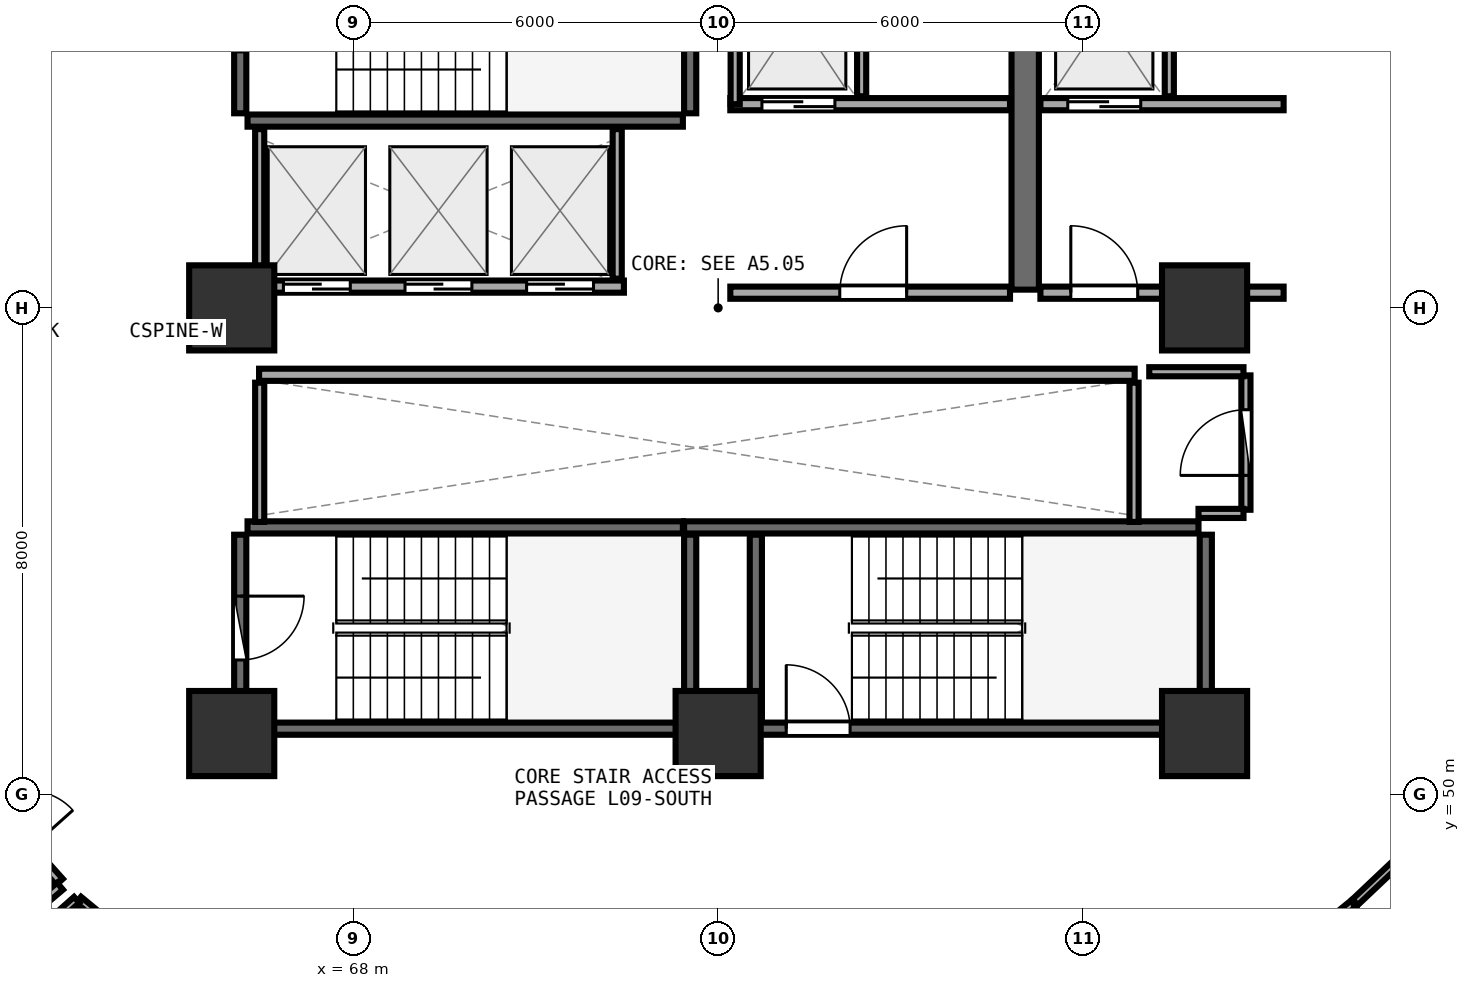
"""IFC4 building model, lengths in metres.
Left out: names, types, materials, properties, quantities, classifications, styles, units other than length and angle.
Written with IfcOpenShell. Run it as: python <this file> out.ifc"""

import sys

from ifc_helpers import new_model, si_unit, direction, frame, frame_2d, origin, origin_2d, place, context, subcontext, project, spatial, rectangle, extrude, element, fill, save


model = new_model("IFC4")
c1 = context("Model", 3, precision=1e-05, world=origin(), true_north=direction((0.0, 1.0)))
c2 = subcontext(c1, "Body", "Model", "MODEL_VIEW")
j1 = project(units=[si_unit("LENGTHUNIT", "METRE"), si_unit("PLANEANGLEUNIT", "RADIAN")], contexts=[c1])
p1 = place(None, origin())
s1 = spatial("IfcSite", under=j1, at=p1, CompositionType="ELEMENT")
p2 = place(p1, origin())
s2 = spatial("IfcBuilding", under=s1, at=p2, CompositionType="ELEMENT")
p3 = place(p2, frame((0.0, 0.0, 37.5)))
s3 = spatial("IfcBuildingStorey", under=s2, at=p3, CompositionType="ELEMENT", Elevation=37.5)
for number, where, z_axis, x_axis in (
    (1, (66.0, 51.0, 0.0), (0.0, 0.0, 1.0), (1.0, 0.0, 0.0)),
    (2, (74.0, 51.0, 0.0), (0.0, 0.0, 1.0), (1.0, 0.0, 0.0)),
    (3, (82.0, 51.0, 0.0), (0.0, 0.0, 1.0), (1.0, 0.0, 0.0)),
    (4, (82.0, 58.0, 0.0), (0.0, 0.0, 1.0), (1.0, 0.0, 0.0)),
    (5, (66.0, 58.0, 0.0), (0.0, 0.0, 1.0), (1.0, 0.0, 0.0)),
):
    element("IfcColumn", number, at=place(p3, frame(where, z_axis=z_axis, x_axis=x_axis)), inside=s3, PredefinedType="PILASTER", context=c2, shape_type="SweptSolid", body=[
        extrude(rectangle(XDim=1.4, YDim=1.4, at=origin_2d()), origin(), (0.0, 0.0, 1.0), 3.75),
    ])
p4 = place(p3, frame((66.26, 61.08, 0.0), z_axis=(0.0, 0.0, 1.0), x_axis=(1.0, 0.0, 0.0)))
e6 = element("IfcWall", 6, at=p4, inside=s3, PredefinedType="SHEAR", context=c2, shape_type="SweptSolid", body=[
    extrude(rectangle(XDim=7.16, YDim=0.2, at=frame_2d((3.58, 0.0))), origin(), (0.0, 0.0, 1.0), 3.49),
])
p5 = place(p3, frame((73.54, 61.2, 0.0), z_axis=(0.0, 0.0, 1.0), x_axis=(0.0, 1.0, 0.0)))
e7 = element("IfcWall", 7, at=p5, inside=s3, PredefinedType="SHEAR", context=c2, shape_type="SweptSolid", body=[
    extrude(rectangle(XDim=3.07, YDim=0.2, at=frame_2d((1.535, 0.0))), origin(), (0.0, 0.0, 1.0), 3.49),
])
p6 = place(p3, frame((66.14, 64.27, 0.0), z_axis=(0.0, 0.0, 1.0), x_axis=(0.0, -1.0, 0.0)))
e8 = element("IfcWall", 8, at=p6, inside=s3, PredefinedType="SHEAR", context=c2, shape_type="SweptSolid", body=[
    extrude(rectangle(XDim=3.07, YDim=0.2, at=frame_2d((1.535, 0.0))), origin(), (0.0, 0.0, 1.0), 3.49),
])
p7 = place(p6, frame((1.01, 0.0, 0.0)))
e9 = element("IfcOpeningElement", 9, at=p7, cuts=e8, PredefinedType="OPENING", context=c2, shape_type="SweptSolid", body=[
    extrude(rectangle(XDim=1.05, YDim=2.1, at=frame_2d((0.525, 1.05))), frame((0.0, 0.11, 0.0), z_axis=(0.0, -1.0, 0.0), x_axis=(1.0, 0.0, 0.0)), (0.0, 0.0, 1.0), 0.22),
])
p8 = place(p3, frame((74.0, 51.08, 0.0), z_axis=(0.0, 0.0, 1.0), x_axis=(1.0, 0.0, 0.0)))
e10 = element("IfcWall", 10, at=p8, inside=s3, PredefinedType="SHEAR", context=c2, shape_type="SweptSolid", body=[
    extrude(rectangle(XDim=7.9, YDim=0.2, at=frame_2d((3.95, 0.0))), origin(), (0.0, 0.0, 1.0), 3.49),
])
p9 = place(p8, frame((1.12, 0.0, 0.0)))
e11 = element("IfcOpeningElement", 11, at=p9, cuts=e10, PredefinedType="OPENING", context=c2, shape_type="SweptSolid", body=[
    extrude(rectangle(XDim=1.05, YDim=2.1, at=frame_2d((0.525, 1.05))), frame((0.0, 0.11, 0.0), z_axis=(0.0, -1.0, 0.0), x_axis=(1.0, 0.0, 0.0)), (0.0, 0.0, 1.0), 0.22),
])
p10 = place(p3, frame((82.02, 51.2, 0.0), z_axis=(0.0, 0.0, 1.0), x_axis=(0.0, 1.0, 0.0)))
e12 = element("IfcWall", 12, at=p10, inside=s3, PredefinedType="SHEAR", context=c2, shape_type="SweptSolid", body=[
    extrude(rectangle(XDim=3.07, YDim=0.2, at=frame_2d((1.535, 0.0))), origin(), (0.0, 0.0, 1.0), 3.49),
])
p11 = place(p3, frame((81.9, 54.39, 0.0), z_axis=(0.0, 0.0, 1.0), x_axis=(-1.0, 0.0, 0.0)))
e13 = element("IfcWall", 13, at=p11, inside=s3, PredefinedType="SHEAR", context=c2, shape_type="SweptSolid", body=[
    extrude(rectangle(XDim=8.46, YDim=0.2, at=frame_2d((4.23, 0.0))), origin(), (0.0, 0.0, 1.0), 3.49),
])
p12 = place(p3, frame((74.62, 54.27, 0.0), z_axis=(0.0, 0.0, 1.0), x_axis=(0.0, -1.0, 0.0)))
e14 = element("IfcWall", 14, at=p12, inside=s3, PredefinedType="SHEAR", context=c2, shape_type="SweptSolid", body=[
    extrude(rectangle(XDim=3.07, YDim=0.2, at=frame_2d((1.535, 0.0))), origin(), (0.0, 0.0, 1.0), 3.49),
])
p13 = place(p3, frame((66.26, 51.08, 0.0), z_axis=(0.0, 0.0, 1.0), x_axis=(1.0, 0.0, 0.0)))
e15 = element("IfcWall", 15, at=p13, inside=s3, PredefinedType="SHEAR", context=c2, shape_type="SweptSolid", body=[
    extrude(rectangle(XDim=7.16, YDim=0.2, at=frame_2d((3.58, 0.0))), origin(), (0.0, 0.0, 1.0), 3.49),
])
p14 = place(p3, frame((73.54, 51.2, 0.0), z_axis=(0.0, 0.0, 1.0), x_axis=(0.0, 1.0, 0.0)))
e16 = element("IfcWall", 16, at=p14, inside=s3, PredefinedType="SHEAR", context=c2, shape_type="SweptSolid", body=[
    extrude(rectangle(XDim=3.07, YDim=0.2, at=frame_2d((1.535, 0.0))), origin(), (0.0, 0.0, 1.0), 3.49),
])
p15 = place(p3, frame((73.42, 54.39, 0.0), z_axis=(0.0, 0.0, 1.0), x_axis=(-1.0, 0.0, 0.0)))
e17 = element("IfcWall", 17, at=p15, inside=s3, PredefinedType="SHEAR", context=c2, shape_type="SweptSolid", body=[
    extrude(rectangle(XDim=7.16, YDim=0.2, at=frame_2d((3.58, 0.0))), origin(), (0.0, 0.0, 1.0), 3.49),
])
p16 = place(p3, frame((66.14, 54.27, 0.0), z_axis=(0.0, 0.0, 1.0), x_axis=(0.0, -1.0, 0.0)))
e18 = element("IfcWall", 18, at=p16, inside=s3, PredefinedType="SHEAR", context=c2, shape_type="SweptSolid", body=[
    extrude(rectangle(XDim=3.07, YDim=0.2, at=frame_2d((1.535, 0.0))), origin(), (0.0, 0.0, 1.0), 3.49),
])
p17 = place(p16, frame((1.01, 0.0, 0.0)))
e19 = element("IfcOpeningElement", 19, at=p17, cuts=e18, PredefinedType="OPENING", context=c2, shape_type="SweptSolid", body=[
    extrude(rectangle(XDim=1.05, YDim=2.1, at=frame_2d((0.525, 1.05))), frame((0.0, 0.11, 0.0), z_axis=(0.0, -1.0, 0.0), x_axis=(1.0, 0.0, 0.0)), (0.0, 0.0, 1.0), 0.22),
])
p18 = place(p3, frame((79.05, 58.3, 0.0), z_axis=(0.0, 0.0, 1.0), x_axis=(0.0, 1.0, 0.0)))
e20 = element("IfcWall", 20, at=p18, inside=s3, PredefinedType="SHEAR", context=c2, shape_type="SweptSolid", body=[
    extrude(rectangle(XDim=6.3, YDim=0.45, at=frame_2d((3.15, 0.0))), origin(), (0.0, 0.0, 1.0), 3.49),
])
p19 = place(p3, frame((74.2, 61.35, 0.0), z_axis=(0.0, 0.0, 1.0), x_axis=(1.0, 0.0, 0.0)))
e21 = element("IfcWall", 21, at=p19, inside=s3, PredefinedType="SOLIDWALL", context=c2, shape_type="SweptSolid", body=[
    extrude(rectangle(XDim=4.6, YDim=0.2, at=frame_2d((2.3, 0.0))), origin(), (0.0, 0.0, 1.0), 3.48),
])
p20 = place(p19, frame((0.52, 0.0, 0.0)))
e22 = element("IfcOpeningElement", 22, at=p20, cuts=e21, PredefinedType="OPENING", context=c2, shape_type="SweptSolid", body=[
    extrude(rectangle(XDim=1.2, YDim=2.15, at=frame_2d((0.6, 1.075))), frame((0.0, 0.11, 0.0), z_axis=(0.0, -1.0, 0.0), x_axis=(1.0, 0.0, 0.0)), (0.0, 0.0, 1.0), 0.22),
])
p21 = place(p3, frame((74.28, 61.35, 0.0), z_axis=(0.0, 0.0, 1.0), x_axis=(0.0, 1.0, 0.0)))
e23 = element("IfcWall", 23, at=p21, inside=s3, PredefinedType="PARTITIONING", context=c2, shape_type="SweptSolid", body=[
    extrude(rectangle(XDim=2.97, YDim=0.15, at=frame_2d((1.485, 0.0))), origin(), (0.0, 0.0, 1.0), 3.48),
])
p22 = place(p3, frame((76.36, 61.48, 0.0), z_axis=(0.0, 0.0, 1.0), x_axis=(0.0, 1.0, 0.0)))
e24 = element("IfcWall", 24, at=p22, inside=s3, PredefinedType="PARTITIONING", context=c2, shape_type="SweptSolid", body=[
    extrude(rectangle(XDim=2.84, YDim=0.15, at=frame_2d((1.42, 0.0))), origin(), (0.0, 0.0, 1.0), 3.48),
])
p23 = place(p3, frame((79.3, 61.35, 0.0), z_axis=(0.0, 0.0, 1.0), x_axis=(1.0, 0.0, 0.0)))
e25 = element("IfcWall", 25, at=p23, inside=s3, PredefinedType="SOLIDWALL", context=c2, shape_type="SweptSolid", body=[
    extrude(rectangle(XDim=4.0, YDim=0.2, at=frame_2d((2.0, 0.0))), origin(), (0.0, 0.0, 1.0), 2.775),
])
p24 = place(p23, frame((0.45, 0.0, 0.0)))
e26 = element("IfcOpeningElement", 26, at=p24, cuts=e25, PredefinedType="OPENING", context=c2, shape_type="SweptSolid", body=[
    extrude(rectangle(XDim=1.2, YDim=2.15, at=frame_2d((0.6, 1.075))), frame((0.0, 0.11, 0.0), z_axis=(0.0, -1.0, 0.0), x_axis=(1.0, 0.0, 0.0)), (0.0, 0.0, 1.0), 0.22),
])
p25 = place(p3, frame((81.42, 61.48, 0.0), z_axis=(0.0, 0.0, 1.0), x_axis=(0.0, 1.0, 0.0)))
e27 = element("IfcWall", 27, at=p25, inside=s3, PredefinedType="PARTITIONING", context=c2, shape_type="SweptSolid", body=[
    extrude(rectangle(XDim=2.84, YDim=0.15, at=frame_2d((1.42, 0.0))), origin(), (0.0, 0.0, 1.0), 3.48),
])
p26 = place(p3, frame((74.2, 58.25, 0.0), z_axis=(0.0, 0.0, 1.0), x_axis=(1.0, 0.0, 0.0)))
e28 = element("IfcWall", 28, at=p26, inside=s3, PredefinedType="SOLIDWALL", context=c2, shape_type="SweptSolid", body=[
    extrude(rectangle(XDim=4.6, YDim=0.2, at=frame_2d((2.3, 0.0))), origin(), (0.0, 0.0, 1.0), 3.48),
])
p27 = place(p26, frame((1.8, 0.0, 0.0)))
e29 = element("IfcOpeningElement", 29, at=p27, cuts=e28, PredefinedType="OPENING", context=c2, shape_type="SweptSolid", body=[
    extrude(rectangle(XDim=1.1, YDim=2.1, at=frame_2d((0.55, 1.05))), frame((0.0, 0.11, 0.0), z_axis=(0.0, -1.0, 0.0), x_axis=(1.0, 0.0, 0.0)), (0.0, 0.0, 1.0), 0.22),
])
p28 = place(p3, frame((79.3, 58.25, 0.0), z_axis=(0.0, 0.0, 1.0), x_axis=(1.0, 0.0, 0.0)))
e30 = element("IfcWall", 30, at=p28, inside=s3, PredefinedType="SOLIDWALL", context=c2, shape_type="SweptSolid", body=[
    extrude(rectangle(XDim=4.0, YDim=0.2, at=frame_2d((2.0, 0.0))), origin(), (0.0, 0.0, 1.0), 2.775),
])
p29 = place(p28, frame((0.5, 0.0, 0.0)))
e31 = element("IfcOpeningElement", 31, at=p29, cuts=e30, PredefinedType="OPENING", context=c2, shape_type="SweptSolid", body=[
    extrude(rectangle(XDim=1.1, YDim=2.1, at=frame_2d((0.55, 1.05))), frame((0.0, 0.11, 0.0), z_axis=(0.0, -1.0, 0.0), x_axis=(1.0, 0.0, 0.0)), (0.0, 0.0, 1.0), 0.22),
])
p30 = place(p3, frame((66.45, 58.35, 0.0), z_axis=(0.0, 0.0, 1.0), x_axis=(1.0, 0.0, 0.0)))
e32 = element("IfcWall", 32, at=p30, inside=s3, PredefinedType="SOLIDWALL", context=c2, shape_type="SweptSolid", body=[
    extrude(rectangle(XDim=6.0, YDim=0.2, at=frame_2d((3.0, 0.0))), origin(), (0.0, 0.0, 1.0), 3.48),
])
p31 = place(p30, frame((0.4, 0.0, 0.0)))
e33 = element("IfcOpeningElement", 33, at=p31, cuts=e32, PredefinedType="OPENING", context=c2, shape_type="SweptSolid", body=[
    extrude(rectangle(XDim=1.1, YDim=2.1, at=frame_2d((0.55, 1.05))), frame((0.0, 0.11, 0.0), z_axis=(0.0, -1.0, 0.0), x_axis=(1.0, 0.0, 0.0)), (0.0, 0.0, 1.0), 0.22),
])
p32 = place(p30, frame((2.4, 0.0, 0.0)))
e34 = element("IfcOpeningElement", 34, at=p32, cuts=e32, PredefinedType="OPENING", context=c2, shape_type="SweptSolid", body=[
    extrude(rectangle(XDim=1.1, YDim=2.1, at=frame_2d((0.55, 1.05))), frame((0.0, 0.11, 0.0), z_axis=(0.0, -1.0, 0.0), x_axis=(1.0, 0.0, 0.0)), (0.0, 0.0, 1.0), 0.22),
])
p33 = place(p30, frame((4.4, 0.0, 0.0)))
e35 = element("IfcOpeningElement", 35, at=p33, cuts=e32, PredefinedType="OPENING", context=c2, shape_type="SweptSolid", body=[
    extrude(rectangle(XDim=1.1, YDim=2.1, at=frame_2d((0.55, 1.05))), frame((0.0, 0.11, 0.0), z_axis=(0.0, -1.0, 0.0), x_axis=(1.0, 0.0, 0.0)), (0.0, 0.0, 1.0), 0.22),
])
for number, where, z_axis, x_axis in (
    (36, (66.46, 58.48, 0.0), (0.0, 0.0, 1.0), (0.0, 1.0, 0.0)),
    (37, (72.34, 58.48, 0.0), (0.0, 0.0, 1.0), (0.0, 1.0, 0.0)),
):
    element("IfcWall", number, at=place(p3, frame(where, z_axis=z_axis, x_axis=x_axis)), inside=s3, PredefinedType="PARTITIONING", context=c2, shape_type="SweptSolid", body=[
        extrude(rectangle(XDim=2.46, YDim=0.15, at=frame_2d((1.23, 0.0))), origin(), (0.0, 0.0, 1.0), 3.48),
    ])
p34 = place(p3, frame((66.45, 56.9, 0.0), z_axis=(0.0, 0.0, 1.0), x_axis=(1.0, 0.0, 0.0)))
e38 = element("IfcWall", 38, at=p34, inside=s3, PredefinedType="SOLIDWALL", context=c2, shape_type="SweptSolid", body=[
    extrude(rectangle(XDim=14.4, YDim=0.2, at=frame_2d((7.2, 0.0))), origin(), (0.0, 0.0, 1.0), 3.48),
])
for number, where, z_axis, x_axis in (
    (39, (66.46, 54.48, 0.0), (0.0, 0.0, 1.0), (0.0, 1.0, 0.0)),
    (40, (80.84, 54.48, 0.0), (0.0, 0.0, 1.0), (0.0, 1.0, 0.0)),
):
    element("IfcWall", number, at=place(p3, frame(where, z_axis=z_axis, x_axis=x_axis)), inside=s3, PredefinedType="PARTITIONING", context=c2, shape_type="SweptSolid", body=[
        extrude(rectangle(XDim=2.29, YDim=0.15, at=frame_2d((1.145, 0.0))), origin(), (0.0, 0.0, 1.0), 3.48),
    ])
p35 = place(p3, frame((82.68, 54.68, 0.0), z_axis=(0.0, 0.0, 1.0), x_axis=(0.0, 1.0, 0.0)))
e41 = element("IfcWall", 41, at=p35, inside=s3, PredefinedType="PARTITIONING", context=c2, shape_type="SweptSolid", body=[
    extrude(rectangle(XDim=2.21, YDim=0.15, at=frame_2d((1.105, 0.0))), origin(), (0.0, 0.0, 1.0), 3.48),
])
p36 = place(p35, frame((0.565, 0.0, 0.0)))
e42 = element("IfcOpeningElement", 42, at=p36, cuts=e41, PredefinedType="OPENING", context=c2, shape_type="SweptSolid", body=[
    extrude(rectangle(XDim=1.08, YDim=2.1, at=frame_2d((0.54, 1.05))), frame((0.0, 0.085, 0.0), z_axis=(0.0, -1.0, 0.0), x_axis=(1.0, 0.0, 0.0)), (0.0, 0.0, 1.0), 0.17),
])
p37 = place(p3, frame((61.559, 50.36, 0.0), z_axis=(0.0, 0.0, 1.0), x_axis=(0.66613233843, -0.745833565682, 0.0)))
e43 = element("IfcWall", 43, at=p37, inside=s3, PredefinedType="PARTITIONING", context=c2, shape_type="SweptSolid", body=[
    extrude(rectangle(XDim=2.414, YDim=0.15, at=frame_2d((1.207, 0.0))), origin(), (0.0, 0.0, 1.0), 2.875),
])
p38 = place(p37, frame((0.732, 0.0, 0.0)))
e44 = element("IfcOpeningElement", 44, at=p38, cuts=e43, PredefinedType="OPENING", context=c2, shape_type="SweptSolid", body=[
    extrude(rectangle(XDim=0.95, YDim=2.08, at=frame_2d((0.475, 1.04))), frame((0.0, 0.085, 0.0), z_axis=(0.0, -1.0, 0.0), x_axis=(1.0, 0.0, 0.0)), (0.0, 0.0, 1.0), 0.17),
])
p39 = place(p3, frame((81.9, 54.62, 0.0), z_axis=(0.0, 0.0, 1.0), x_axis=(1.0, 0.0, 0.0)))
e45 = element("IfcWall", 45, at=p39, inside=s3, PredefinedType="PARTITIONING", context=c2, shape_type="SweptSolid", body=[
    extrude(rectangle(XDim=0.74, YDim=0.15, at=frame_2d((0.37, 0.0))), origin(), (0.0, 0.0, 1.0), 2.775),
])
p40 = place(p3, frame((82.64, 56.95, 0.0), z_axis=(0.0, 0.0, 1.0), x_axis=(-1.0, 0.0, 0.0)))
e46 = element("IfcWall", 46, at=p40, inside=s3, PredefinedType="PARTITIONING", context=c2, shape_type="SweptSolid", body=[
    extrude(rectangle(XDim=1.55, YDim=0.15, at=frame_2d((0.775, 0.0))), origin(), (0.0, 0.0, 1.0), 2.775),
])
p41 = place(p3, frame((83.656, 47.557, 0.0), z_axis=(0.0, 0.0, 1.0), x_axis=(0.774821757106, 0.632179756648, 0.0)))
e47 = element("IfcWall", 47, at=p41, inside=s3, PredefinedType="PLUMBINGWALL", context=c2, shape_type="SweptSolid", body=[
    extrude(rectangle(XDim=1.018, YDim=0.13, at=frame_2d((0.509, 0.0))), origin(), (0.0, 0.0, 1.0), 3.48),
])
p42 = place(p3, frame((84.476, 48.227, 0.0), z_axis=(0.0, 0.0, 1.0), x_axis=(0.726289091807, 0.687389376644, 0.0)))
e48 = element("IfcWall", 48, at=p42, inside=s3, PredefinedType="PLUMBINGWALL", context=c2, shape_type="SweptSolid", body=[
    extrude(rectangle(XDim=1.01, YDim=0.13, at=frame_2d((0.505, 0.0))), origin(), (0.0, 0.0, 1.0), 2.875),
])
p43 = place(p3, frame((63.177, 48.489, 0.0), z_axis=(0.0, 0.0, 1.0), x_axis=(-0.763989878534, -0.64522822745, 0.0)))
e49 = element("IfcWall", 49, at=p43, inside=s3, PredefinedType="PARTITIONING", context=c2, shape_type="SweptSolid", body=[
    extrude(rectangle(XDim=11.623, YDim=0.15, at=frame_2d((5.812, 0.0))), origin(), (0.0, 0.0, 1.0), 2.875),
])
p44 = place(p3, frame((63.48, 48.265, 0.0), z_axis=(0.0, 0.0, 1.0), x_axis=(0.770536510973, -0.637395862284, 0.0)))
e50 = element("IfcWall", 50, at=p44, inside=s3, PredefinedType="PLUMBINGWALL", context=c2, shape_type="SweptSolid", body=[
    extrude(rectangle(XDim=1.018, YDim=0.13, at=frame_2d((0.509, 0.0))), origin(), (0.0, 0.0, 1.0), 3.48),
])
p45 = place(p3, frame((60.192, 45.379, 0.0), z_axis=(0.0, 0.0, 1.0), x_axis=(0.748639888461, 0.662976860384, 0.0)))
e51 = element("IfcWall", 51, at=p45, inside=s3, PredefinedType="PLUMBINGWALL", context=c2, shape_type="SweptSolid", body=[
    extrude(rectangle(XDim=4.352, YDim=0.13, at=frame_2d((2.176, 0.0))), origin(), (0.0, 0.0, 1.0), 3.235),
])
p46 = place(p9, origin())
e52 = element("IfcDoor", 52, at=p46, inside=s3, OperationType="SINGLE_SWING_LEFT", PredefinedType="DOOR", context=c2, shape_type="SweptSolid", body=[
    extrude(rectangle(XDim=1.05, YDim=2.1, at=frame_2d((0.525, 1.05))), frame((0.0, 0.025, 0.0), z_axis=(0.0, -1.0, 0.0), x_axis=(1.0, 0.0, 0.0)), (0.0, 0.0, 1.0), 0.05),
])
fill(e11, e52)
p47 = place(p17, origin())
e53 = element("IfcDoor", 53, at=p47, inside=s3, OperationType="SINGLE_SWING_LEFT", PredefinedType="DOOR", context=c2, shape_type="SweptSolid", body=[
    extrude(rectangle(XDim=1.05, YDim=2.1, at=frame_2d((0.525, 1.05))), frame((0.0, 0.025, 0.0), z_axis=(0.0, -1.0, 0.0), x_axis=(1.0, 0.0, 0.0)), (0.0, 0.0, 1.0), 0.05),
])
fill(e19, e53)
p48 = place(p20, origin())
e54 = element("IfcDoor", 54, at=p48, inside=s3, OperationType="DOUBLE_DOOR_SLIDING", PredefinedType="DOOR", context=c2, shape_type="SweptSolid", body=[
    extrude(rectangle(XDim=1.2, YDim=2.15, at=frame_2d((0.6, 1.075))), frame((0.0, 0.025, 0.0), z_axis=(0.0, -1.0, 0.0), x_axis=(1.0, 0.0, 0.0)), (0.0, 0.0, 1.0), 0.05),
])
fill(e22, e54)
p49 = place(p24, origin())
e55 = element("IfcDoor", 55, at=p49, inside=s3, OperationType="DOUBLE_DOOR_SLIDING", PredefinedType="DOOR", context=c2, shape_type="SweptSolid", body=[
    extrude(rectangle(XDim=1.2, YDim=2.15, at=frame_2d((0.6, 1.075))), frame((0.0, 0.025, 0.0), z_axis=(0.0, -1.0, 0.0), x_axis=(1.0, 0.0, 0.0)), (0.0, 0.0, 1.0), 0.05),
])
fill(e26, e55)
p50 = place(p27, frame((1.1, 0.0, 0.0), z_axis=(0.0, 0.0, 1.0), x_axis=(-1.0, 0.0, 0.0)))
e56 = element("IfcDoor", 56, at=p50, inside=s3, OperationType="SINGLE_SWING_LEFT", PredefinedType="DOOR", context=c2, shape_type="SweptSolid", body=[
    extrude(rectangle(XDim=1.1, YDim=2.1, at=frame_2d((0.55, 1.05))), frame((0.0, 0.025, 0.0), z_axis=(0.0, -1.0, 0.0), x_axis=(1.0, 0.0, 0.0)), (0.0, 0.0, 1.0), 0.05),
])
fill(e29, e56)
p51 = place(p29, frame((1.1, 0.0, 0.0), z_axis=(0.0, 0.0, 1.0), x_axis=(-1.0, 0.0, 0.0)))
e57 = element("IfcDoor", 57, at=p51, inside=s3, OperationType="SINGLE_SWING_RIGHT", PredefinedType="DOOR", context=c2, shape_type="SweptSolid", body=[
    extrude(rectangle(XDim=1.1, YDim=2.1, at=frame_2d((0.55, 1.05))), frame((0.0, 0.025, 0.0), z_axis=(0.0, -1.0, 0.0), x_axis=(1.0, 0.0, 0.0)), (0.0, 0.0, 1.0), 0.05),
])
fill(e31, e57)
p52 = place(p31, origin())
e58 = element("IfcDoor", 58, at=p52, inside=s3, OperationType="DOUBLE_DOOR_SLIDING", PredefinedType="DOOR", context=c2, shape_type="SweptSolid", body=[
    extrude(rectangle(XDim=1.1, YDim=2.1, at=frame_2d((0.55, 1.05))), frame((0.0, 0.025, 0.0), z_axis=(0.0, -1.0, 0.0), x_axis=(1.0, 0.0, 0.0)), (0.0, 0.0, 1.0), 0.05),
])
fill(e33, e58)
p53 = place(p32, origin())
e59 = element("IfcDoor", 59, at=p53, inside=s3, OperationType="DOUBLE_DOOR_SLIDING", PredefinedType="DOOR", context=c2, shape_type="SweptSolid", body=[
    extrude(rectangle(XDim=1.1, YDim=2.1, at=frame_2d((0.55, 1.05))), frame((0.0, 0.025, 0.0), z_axis=(0.0, -1.0, 0.0), x_axis=(1.0, 0.0, 0.0)), (0.0, 0.0, 1.0), 0.05),
])
fill(e34, e59)
p54 = place(p33, origin())
e60 = element("IfcDoor", 60, at=p54, inside=s3, OperationType="DOUBLE_DOOR_SLIDING", PredefinedType="DOOR", context=c2, shape_type="SweptSolid", body=[
    extrude(rectangle(XDim=1.1, YDim=2.1, at=frame_2d((0.55, 1.05))), frame((0.0, 0.025, 0.0), z_axis=(0.0, -1.0, 0.0), x_axis=(1.0, 0.0, 0.0)), (0.0, 0.0, 1.0), 0.05),
])
fill(e35, e60)
p55 = place(p36, origin())
e61 = element("IfcDoor", 61, at=p55, inside=s3, OperationType="SINGLE_SWING_LEFT", PredefinedType="DOOR", context=c2, shape_type="SweptSolid", body=[
    extrude(rectangle(XDim=1.08, YDim=2.1, at=frame_2d((0.54, 1.05))), frame((0.0, 0.025, 0.0), z_axis=(0.0, -1.0, 0.0), x_axis=(1.0, 0.0, 0.0)), (0.0, 0.0, 1.0), 0.05),
])
fill(e42, e61)
save(model, sys.argv[1])
